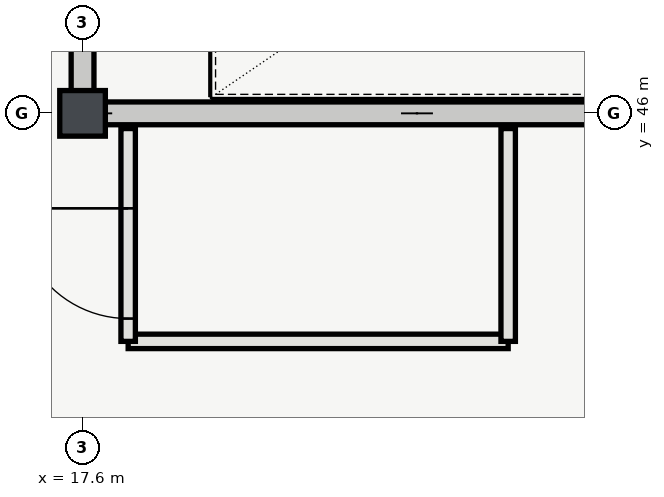
"""IFC4 building model, lengths in metres.
Left out: names, types, materials, properties, quantities, classifications, styles, units other than length and angle.
Written with IfcOpenShell. Run it as: python <this file> out.ifc"""

import sys

from ifc_helpers import new_model, si_unit, direction, frame, frame_2d, origin, origin_2d, place, context, subcontext, project, spatial, rectangle, extrude, element, fill, save


model = new_model("IFC4")
c1 = context("Model", 3, precision=1e-05, world=origin(), true_north=direction((0.0, 1.0)))
c2 = subcontext(c1, "Body", "Model", "MODEL_VIEW")
j1 = project(units=[si_unit("LENGTHUNIT", "METRE"), si_unit("PLANEANGLEUNIT", "RADIAN")], contexts=[c1])
p1 = place(None, origin())
s1 = spatial("IfcSite", under=j1, at=p1, CompositionType="ELEMENT")
p2 = place(p1, origin())
s2 = spatial("IfcBuilding", under=s1, at=p2, CompositionType="ELEMENT")
p3 = place(p2, frame((0.0, 0.0, 41.4)))
s3 = spatial("IfcBuildingStorey", under=s2, at=p3, CompositionType="ELEMENT", Elevation=41.4)
p4 = place(p3, frame((17.6, 46.0, 0.0), z_axis=(0.0, 0.0, 1.0), x_axis=(1.0, 0.0, 0.0)))
e1 = element("IfcColumn", 1, at=p4, inside=s3, PredefinedType="COLUMN", context=c2, shape_type="SweptSolid", body=[
    extrude(rectangle(XDim=0.6, YDim=0.6, at=origin_2d()), origin(), (0.0, 0.0, 1.0), 4.2),
])
p5 = place(p3, frame((17.45, 46.0, 0.0), z_axis=(0.0, 0.0, 1.0), x_axis=(1.0, 0.0, 0.0)))
e2 = element("IfcWall", 2, at=p5, inside=s3, PredefinedType="SHEAR", context=c2, shape_type="SweptSolid", body=[
    extrude(rectangle(XDim=9.1, YDim=0.3, at=frame_2d((4.55, 0.0))), origin(), (0.0, 0.0, 1.0), 3.92),
])
p6 = place(p3, frame((17.6, 46.15, 0.0), z_axis=(0.0, 0.0, 1.0), x_axis=(0.0, 1.0, 0.0)))
e3 = element("IfcWall", 3, at=p6, inside=s3, PredefinedType="SHEAR", context=c2, shape_type="SweptSolid", body=[
    extrude(rectangle(XDim=7.7, YDim=0.3, at=frame_2d((3.85, 0.0))), origin(), (0.0, 0.0, 1.0), 3.92),
])
p7 = place(p6, frame((1.65, 0.0, 0.0)))
e4 = element("IfcOpeningElement", 4, at=p7, cuts=e3, PredefinedType="OPENING", context=c2, shape_type="SweptSolid", body=[
    extrude(rectangle(XDim=1.4, YDim=2.2, at=frame_2d((0.7, 1.1))), frame((0.0, 0.16, 0.0), z_axis=(0.0, -1.0, 0.0), x_axis=(1.0, 0.0, 0.0)), (0.0, 0.0, 1.0), 0.32),
])
p8 = place(p3, frame((18.2, 43.0, 0.0), z_axis=(0.0, 0.0, 1.0), x_axis=(1.0, 0.0, 0.0)))
e5 = element("IfcWall", 5, at=p8, inside=s3, PredefinedType="PARTITIONING", context=c2, shape_type="SweptSolid", body=[
    extrude(rectangle(XDim=5.0, YDim=0.19, at=frame_2d((2.5, 0.0))), origin(), (0.0, 0.0, 1.0), 3.92),
])
p9 = place(p3, frame((18.2, 45.8, 0.0), z_axis=(0.0, 0.0, 1.0), x_axis=(0.0, -1.0, 0.0)))
e6 = element("IfcWall", 6, at=p9, inside=s3, PredefinedType="PARTITIONING", context=c2, shape_type="SweptSolid", body=[
    extrude(rectangle(XDim=2.8, YDim=0.19, at=frame_2d((1.4, 0.0))), origin(), (0.0, 0.0, 1.0), 3.92),
])
p10 = place(p9, frame((1.05, 0.0, 0.0)))
e7 = element("IfcOpeningElement", 7, at=p10, cuts=e6, PredefinedType="OPENING", context=c2, shape_type="SweptSolid", body=[
    extrude(rectangle(XDim=1.45, YDim=2.2, at=frame_2d((0.725, 1.1))), frame((0.0, 0.105, 0.0), z_axis=(0.0, -1.0, 0.0), x_axis=(1.0, 0.0, 0.0)), (0.0, 0.0, 1.0), 0.21),
])
p11 = place(p3, frame((23.2, 43.0, 0.0), z_axis=(0.0, 0.0, 1.0), x_axis=(0.0, 1.0, 0.0)))
e8 = element("IfcWall", 8, at=p11, inside=s3, PredefinedType="PARTITIONING", context=c2, shape_type="SweptSolid", body=[
    extrude(rectangle(XDim=2.8, YDim=0.19, at=frame_2d((1.4, 0.0))), origin(), (0.0, 0.0, 1.0), 3.92),
])
p12 = place(p10, origin())
e9 = element("IfcDoor", 9, at=p12, inside=s3, OperationType="SINGLE_SWING_LEFT", PredefinedType="DOOR", context=c2, shape_type="SweptSolid", body=[
    extrude(rectangle(XDim=1.45, YDim=2.2, at=frame_2d((0.725, 1.1))), frame((0.0, 0.025, 0.0), z_axis=(0.0, -1.0, 0.0), x_axis=(1.0, 0.0, 0.0)), (0.0, 0.0, 1.0), 0.05),
])
fill(e7, e9)
save(model, sys.argv[1])
